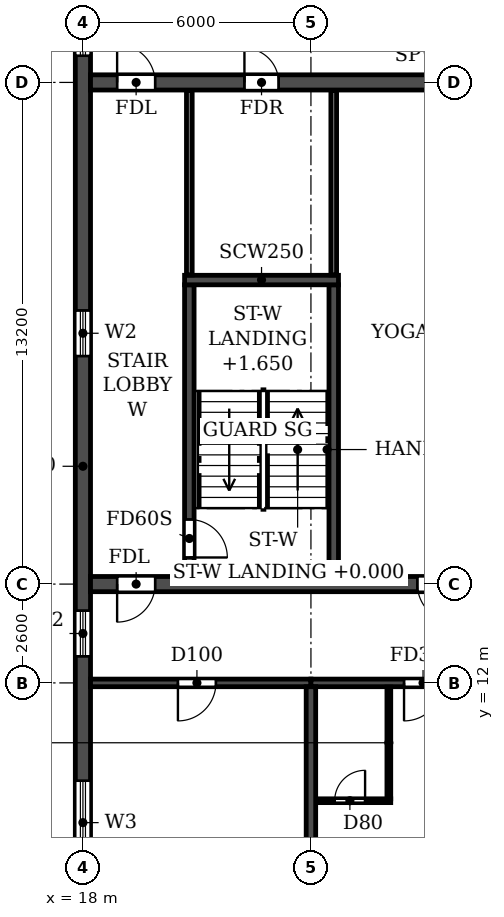
"""IFC4 building model, lengths in metres.
Left out: names, types, materials, properties, quantities, classifications, styles, units other than length and angle.
Written with IfcOpenShell. Run it as: python <this file> out.ifc"""

import sys

from ifc_helpers import new_model, si_unit, direction, frame, frame_2d, origin, place, context, subcontext, project, spatial, rectangle, extrude, element, fill, save


model = new_model("IFC4")
c1 = context("Model", 3, precision=1e-05, world=origin(), true_north=direction((0.0, 1.0)))
c2 = subcontext(c1, "Body", "Model", "MODEL_VIEW")
j1 = project(units=[si_unit("LENGTHUNIT", "METRE"), si_unit("PLANEANGLEUNIT", "RADIAN")], contexts=[c1])
p1 = place(None, origin())
s1 = spatial("IfcSite", under=j1, at=p1, CompositionType="ELEMENT")
p2 = place(p1, origin())
s2 = spatial("IfcBuilding", under=s1, at=p2, CompositionType="ELEMENT")
p3 = place(p2, frame((0.0, 0.0, 191.7)))
s3 = spatial("IfcBuildingStorey", under=s2, at=p3, CompositionType="ELEMENT", Elevation=191.7)
p4 = place(p3, frame((24.0, 0.2, 0.0), z_axis=(0.0, 0.0, 1.0), x_axis=(0.0, 1.0, 0.0)))
e1 = element("IfcWall", 1, at=p4, inside=s3, PredefinedType="SHEAR", context=c2, shape_type="SweptSolid", body=[
    extrude(rectangle(XDim=11.7, YDim=0.25, at=frame_2d((5.85, 0.0))), origin(), (0.0, 0.0, 1.0), 3.08),
])
p5 = place(p3, frame((18.0, 4.683, 0.0), z_axis=(0.0, 0.0, 1.0), x_axis=(0.0, 1.0, 0.0)))
e2 = element("IfcWall", 2, at=p5, inside=s3, PredefinedType="SHEAR", context=c2, shape_type="SweptSolid", body=[
    extrude(rectangle(XDim=31.834, YDim=0.4, at=frame_2d((15.917, 0.0))), origin(), (0.0, 0.0, 1.0), 3.08),
])
p6 = place(p5, frame((23.817, 0.0, 0.9)))
e3 = element("IfcOpeningElement", 3, at=p6, cuts=e2, PredefinedType="OPENING", context=c2, shape_type="SweptSolid", body=[
    extrude(rectangle(XDim=1.2, YDim=1.5, at=frame_2d((0.6, 0.75))), frame((0.0, 0.21, 0.0), z_axis=(0.0, -1.0, 0.0), x_axis=(1.0, 0.0, 0.0)), (0.0, 0.0, 1.0), 0.42),
])
p7 = place(p5, frame((8.017, 0.0, 0.9)))
e4 = element("IfcOpeningElement", 4, at=p7, cuts=e2, PredefinedType="OPENING", context=c2, shape_type="SweptSolid", body=[
    extrude(rectangle(XDim=1.2, YDim=1.5, at=frame_2d((0.6, 0.75))), frame((0.0, 0.21, 0.0), z_axis=(0.0, -1.0, 0.0), x_axis=(1.0, 0.0, 0.0)), (0.0, 0.0, 1.0), 0.42),
])
p8 = place(p5, frame((27.694, 0.0, 0.6)))
e5 = element("IfcOpeningElement", 5, at=p8, cuts=e2, PredefinedType="OPENING", context=c2, shape_type="SweptSolid", body=[
    extrude(rectangle(XDim=2.2, YDim=1.8, at=frame_2d((1.1, 0.9))), frame((0.0, 0.21, 0.0), z_axis=(0.0, -1.0, 0.0), x_axis=(1.0, 0.0, 0.0)), (0.0, 0.0, 1.0), 0.42),
])
p9 = place(p5, frame((2.541, 0.0, 0.6)))
e6 = element("IfcOpeningElement", 6, at=p9, cuts=e2, PredefinedType="OPENING", context=c2, shape_type="SweptSolid", body=[
    extrude(rectangle(XDim=2.2, YDim=1.8, at=frame_2d((1.1, 0.9))), frame((0.0, 0.21, 0.0), z_axis=(0.0, -1.0, 0.0), x_axis=(1.0, 0.0, 0.0)), (0.0, 0.0, 1.0), 0.42),
])
p10 = place(p5, frame((15.917, 0.0, 0.9)))
e7 = element("IfcOpeningElement", 7, at=p10, cuts=e2, PredefinedType="OPENING", context=c2, shape_type="SweptSolid", body=[
    extrude(rectangle(XDim=1.2, YDim=1.5, at=frame_2d((0.6, 0.75))), frame((0.0, 0.21, 0.0), z_axis=(0.0, -1.0, 0.0), x_axis=(1.0, 0.0, 0.0)), (0.0, 0.0, 1.0), 0.42),
])
p11 = place(p3, frame((18.2, 12.0, 0.0), z_axis=(0.0, 0.0, 1.0), x_axis=(1.0, 0.0, 0.0)))
e8 = element("IfcWall", 8, at=p11, inside=s3, PredefinedType="SHEAR", context=c2, shape_type="SweptSolid", body=[
    extrude(rectangle(XDim=5.8, YDim=0.2, at=frame_2d((2.9, 0.0))), origin(), (0.0, 0.0, 1.0), 2.48),
])
p12 = place(p11, frame((2.3, 0.0, 0.0)))
e9 = element("IfcOpeningElement", 9, at=p12, cuts=e8, PredefinedType="OPENING", context=c2, shape_type="SweptSolid", body=[
    extrude(rectangle(XDim=1.0, YDim=2.1, at=frame_2d((0.5, 1.05))), frame((0.0, 0.11, 0.0), z_axis=(0.0, -1.0, 0.0), x_axis=(1.0, 0.0, 0.0)), (0.0, 0.0, 1.0), 0.22),
])
p13 = place(p3, frame((24.0, 12.0, 0.0), z_axis=(0.0, 0.0, 1.0), x_axis=(1.0, 0.0, 0.0)))
e10 = element("IfcWall", 10, at=p13, inside=s3, PredefinedType="SHEAR", context=c2, shape_type="SweptSolid", body=[
    extrude(rectangle(XDim=6.0, YDim=0.2, at=frame_2d((3.0, 0.0))), origin(), (0.0, 0.0, 1.0), 2.48),
])
p14 = place(p13, frame((2.45, 0.0, 0.0)))
e11 = element("IfcOpeningElement", 11, at=p14, cuts=e10, PredefinedType="OPENING", context=c2, shape_type="SweptSolid", body=[
    extrude(rectangle(XDim=1.0, YDim=2.1, at=frame_2d((0.5, 1.05))), frame((0.0, 0.11, 0.0), z_axis=(0.0, -1.0, 0.0), x_axis=(1.0, 0.0, 0.0)), (0.0, 0.0, 1.0), 0.22),
])
p15 = place(p3, frame((18.2, 14.6, 0.0), z_axis=(0.0, 0.0, 1.0), x_axis=(1.0, 0.0, 0.0)))
e12 = element("IfcWall", 12, at=p15, inside=s3, PredefinedType="SOLIDWALL", context=c2, shape_type="SweptSolid", body=[
    extrude(rectangle(XDim=65.6, YDim=0.4, at=frame_2d((32.8, 0.0))), origin(), (0.0, 0.0, 1.0), 3.08),
])
p16 = place(p15, frame((0.7, 0.0, 0.0)))
e13 = element("IfcOpeningElement", 13, at=p16, cuts=e12, PredefinedType="OPENING", context=c2, shape_type="SweptSolid", body=[
    extrude(rectangle(XDim=1.0, YDim=2.1, at=frame_2d((0.5, 1.05))), frame((0.0, 0.21, 0.0), z_axis=(0.0, -1.0, 0.0), x_axis=(1.0, 0.0, 0.0)), (0.0, 0.0, 1.0), 0.42),
])
p17 = place(p15, frame((8.6, 0.0, 0.0)))
e14 = element("IfcOpeningElement", 14, at=p17, cuts=e12, PredefinedType="OPENING", context=c2, shape_type="SweptSolid", body=[
    extrude(rectangle(XDim=1.0, YDim=2.1, at=frame_2d((0.5, 1.05))), frame((0.0, 0.21, 0.0), z_axis=(0.0, -1.0, 0.0), x_axis=(1.0, 0.0, 0.0)), (0.0, 0.0, 1.0), 0.42),
])
p18 = place(p15, frame((13.2, 0.0, 0.0)))
e15 = element("IfcOpeningElement", 15, at=p18, cuts=e12, PredefinedType="OPENING", context=c2, shape_type="SweptSolid", body=[
    extrude(rectangle(XDim=1.0, YDim=2.1, at=frame_2d((0.5, 1.05))), frame((0.0, 0.21, 0.0), z_axis=(0.0, -1.0, 0.0), x_axis=(1.0, 0.0, 0.0)), (0.0, 0.0, 1.0), 0.42),
])
p19 = place(p15, frame((25.55, 0.0, 0.0)))
e16 = element("IfcOpeningElement", 16, at=p19, cuts=e12, PredefinedType="OPENING", context=c2, shape_type="SweptSolid", body=[
    extrude(rectangle(XDim=1.5, YDim=2.1, at=frame_2d((0.75, 1.05))), frame((0.0, 0.21, 0.0), z_axis=(0.0, -1.0, 0.0), x_axis=(1.0, 0.0, 0.0)), (0.0, 0.0, 1.0), 0.42),
])
p20 = place(p15, frame((29.7, 0.0, 0.0)))
e17 = element("IfcOpeningElement", 17, at=p20, cuts=e12, PredefinedType="OPENING", context=c2, shape_type="SweptSolid", body=[
    extrude(rectangle(XDim=1.0, YDim=2.1, at=frame_2d((0.5, 1.05))), frame((0.0, 0.21, 0.0), z_axis=(0.0, -1.0, 0.0), x_axis=(1.0, 0.0, 0.0)), (0.0, 0.0, 1.0), 0.42),
])
p21 = place(p15, frame((32.3, 0.0, 0.0)))
e18 = element("IfcOpeningElement", 18, at=p21, cuts=e12, PredefinedType="OPENING", context=c2, shape_type="SweptSolid", body=[
    extrude(rectangle(XDim=1.0, YDim=2.1, at=frame_2d((0.5, 1.05))), frame((0.0, 0.21, 0.0), z_axis=(0.0, -1.0, 0.0), x_axis=(1.0, 0.0, 0.0)), (0.0, 0.0, 1.0), 0.42),
])
p22 = place(p15, frame((34.9, 0.0, 0.0)))
e19 = element("IfcOpeningElement", 19, at=p22, cuts=e12, PredefinedType="OPENING", context=c2, shape_type="SweptSolid", body=[
    extrude(rectangle(XDim=1.0, YDim=2.1, at=frame_2d((0.5, 1.05))), frame((0.0, 0.21, 0.0), z_axis=(0.0, -1.0, 0.0), x_axis=(1.0, 0.0, 0.0)), (0.0, 0.0, 1.0), 0.42),
])
p23 = place(p15, frame((38.55, 0.0, 0.0)))
e20 = element("IfcOpeningElement", 20, at=p23, cuts=e12, PredefinedType="OPENING", context=c2, shape_type="SweptSolid", body=[
    extrude(rectangle(XDim=1.5, YDim=2.1, at=frame_2d((0.75, 1.05))), frame((0.0, 0.21, 0.0), z_axis=(0.0, -1.0, 0.0), x_axis=(1.0, 0.0, 0.0)), (0.0, 0.0, 1.0), 0.42),
])
p24 = place(p15, frame((51.4, 0.0, 0.0)))
e21 = element("IfcOpeningElement", 21, at=p24, cuts=e12, PredefinedType="OPENING", context=c2, shape_type="SweptSolid", body=[
    extrude(rectangle(XDim=1.0, YDim=2.1, at=frame_2d((0.5, 1.05))), frame((0.0, 0.21, 0.0), z_axis=(0.0, -1.0, 0.0), x_axis=(1.0, 0.0, 0.0)), (0.0, 0.0, 1.0), 0.42),
])
p25 = place(p15, frame((56.0, 0.0, 0.0)))
e22 = element("IfcOpeningElement", 22, at=p25, cuts=e12, PredefinedType="OPENING", context=c2, shape_type="SweptSolid", body=[
    extrude(rectangle(XDim=1.0, YDim=2.1, at=frame_2d((0.5, 1.05))), frame((0.0, 0.21, 0.0), z_axis=(0.0, -1.0, 0.0), x_axis=(1.0, 0.0, 0.0)), (0.0, 0.0, 1.0), 0.42),
])
p26 = place(p15, frame((63.9, 0.0, 0.0)))
e23 = element("IfcOpeningElement", 23, at=p26, cuts=e12, PredefinedType="OPENING", context=c2, shape_type="SweptSolid", body=[
    extrude(rectangle(XDim=1.0, YDim=2.1, at=frame_2d((0.5, 1.05))), frame((0.0, 0.21, 0.0), z_axis=(0.0, -1.0, 0.0), x_axis=(1.0, 0.0, 0.0)), (0.0, 0.0, 1.0), 0.42),
])
p27 = place(p3, frame((18.2, 27.8, 0.0), z_axis=(0.0, 0.0, 1.0), x_axis=(1.0, 0.0, 0.0)))
e24 = element("IfcWall", 24, at=p27, inside=s3, PredefinedType="SOLIDWALL", context=c2, shape_type="SweptSolid", body=[
    extrude(rectangle(XDim=65.6, YDim=0.4, at=frame_2d((32.8, 0.0))), origin(), (0.0, 0.0, 1.0), 3.08),
])
p28 = place(p27, frame((0.7, 0.0, 0.0)))
e25 = element("IfcOpeningElement", 25, at=p28, cuts=e24, PredefinedType="OPENING", context=c2, shape_type="SweptSolid", body=[
    extrude(rectangle(XDim=1.0, YDim=2.1, at=frame_2d((0.5, 1.05))), frame((0.0, 0.21, 0.0), z_axis=(0.0, -1.0, 0.0), x_axis=(1.0, 0.0, 0.0)), (0.0, 0.0, 1.0), 0.42),
])
p29 = place(p27, frame((4.05, 0.0, 0.0)))
e26 = element("IfcOpeningElement", 26, at=p29, cuts=e24, PredefinedType="OPENING", context=c2, shape_type="SweptSolid", body=[
    extrude(rectangle(XDim=0.9, YDim=2.1, at=frame_2d((0.45, 1.05))), frame((0.0, 0.21, 0.0), z_axis=(0.0, -1.0, 0.0), x_axis=(1.0, 0.0, 0.0)), (0.0, 0.0, 1.0), 0.42),
])
p30 = place(p27, frame((13.25, 0.0, 0.0)))
e27 = element("IfcOpeningElement", 27, at=p30, cuts=e24, PredefinedType="OPENING", context=c2, shape_type="SweptSolid", body=[
    extrude(rectangle(XDim=0.9, YDim=2.1, at=frame_2d((0.45, 1.05))), frame((0.0, 0.21, 0.0), z_axis=(0.0, -1.0, 0.0), x_axis=(1.0, 0.0, 0.0)), (0.0, 0.0, 1.0), 0.42),
])
p31 = place(p27, frame((16.4, 0.0, 0.0)))
e28 = element("IfcOpeningElement", 28, at=p31, cuts=e24, PredefinedType="OPENING", context=c2, shape_type="SweptSolid", body=[
    extrude(rectangle(XDim=1.0, YDim=2.1, at=frame_2d((0.5, 1.05))), frame((0.0, 0.21, 0.0), z_axis=(0.0, -1.0, 0.0), x_axis=(1.0, 0.0, 0.0)), (0.0, 0.0, 1.0), 0.42),
])
p32 = place(p27, frame((21.6, 0.0, 0.0)))
e29 = element("IfcOpeningElement", 29, at=p32, cuts=e24, PredefinedType="OPENING", context=c2, shape_type="SweptSolid", body=[
    extrude(rectangle(XDim=1.0, YDim=2.1, at=frame_2d((0.5, 1.05))), frame((0.0, 0.21, 0.0), z_axis=(0.0, -1.0, 0.0), x_axis=(1.0, 0.0, 0.0)), (0.0, 0.0, 1.0), 0.42),
])
p33 = place(p27, frame((29.4, 0.0, 0.0)))
e30 = element("IfcOpeningElement", 30, at=p33, cuts=e24, PredefinedType="OPENING", context=c2, shape_type="SweptSolid", body=[
    extrude(rectangle(XDim=1.0, YDim=2.1, at=frame_2d((0.5, 1.05))), frame((0.0, 0.21, 0.0), z_axis=(0.0, -1.0, 0.0), x_axis=(1.0, 0.0, 0.0)), (0.0, 0.0, 1.0), 0.42),
])
p34 = place(p27, frame((32.3, 0.0, 0.0)))
e31 = element("IfcOpeningElement", 31, at=p34, cuts=e24, PredefinedType="OPENING", context=c2, shape_type="SweptSolid", body=[
    extrude(rectangle(XDim=1.0, YDim=2.1, at=frame_2d((0.5, 1.05))), frame((0.0, 0.21, 0.0), z_axis=(0.0, -1.0, 0.0), x_axis=(1.0, 0.0, 0.0)), (0.0, 0.0, 1.0), 0.42),
])
p35 = place(p27, frame((35.2, 0.0, 0.0)))
e32 = element("IfcOpeningElement", 32, at=p35, cuts=e24, PredefinedType="OPENING", context=c2, shape_type="SweptSolid", body=[
    extrude(rectangle(XDim=1.0, YDim=2.1, at=frame_2d((0.5, 1.05))), frame((0.0, 0.21, 0.0), z_axis=(0.0, -1.0, 0.0), x_axis=(1.0, 0.0, 0.0)), (0.0, 0.0, 1.0), 0.42),
])
p36 = place(p27, frame((37.8, 0.0, 0.0)))
e33 = element("IfcOpeningElement", 33, at=p36, cuts=e24, PredefinedType="OPENING", context=c2, shape_type="SweptSolid", body=[
    extrude(rectangle(XDim=1.0, YDim=2.1, at=frame_2d((0.5, 1.05))), frame((0.0, 0.21, 0.0), z_axis=(0.0, -1.0, 0.0), x_axis=(1.0, 0.0, 0.0)), (0.0, 0.0, 1.0), 0.42),
])
p37 = place(p27, frame((41.7, 0.0, 0.0)))
e34 = element("IfcOpeningElement", 34, at=p37, cuts=e24, PredefinedType="OPENING", context=c2, shape_type="SweptSolid", body=[
    extrude(rectangle(XDim=1.0, YDim=2.1, at=frame_2d((0.5, 1.05))), frame((0.0, 0.21, 0.0), z_axis=(0.0, -1.0, 0.0), x_axis=(1.0, 0.0, 0.0)), (0.0, 0.0, 1.0), 0.42),
])
p38 = place(p27, frame((45.6, 0.0, 0.0)))
e35 = element("IfcOpeningElement", 35, at=p38, cuts=e24, PredefinedType="OPENING", context=c2, shape_type="SweptSolid", body=[
    extrude(rectangle(XDim=1.0, YDim=2.1, at=frame_2d((0.5, 1.05))), frame((0.0, 0.21, 0.0), z_axis=(0.0, -1.0, 0.0), x_axis=(1.0, 0.0, 0.0)), (0.0, 0.0, 1.0), 0.42),
])
p39 = place(p27, frame((48.2, 0.0, 0.0)))
e36 = element("IfcOpeningElement", 36, at=p39, cuts=e24, PredefinedType="OPENING", context=c2, shape_type="SweptSolid", body=[
    extrude(rectangle(XDim=1.0, YDim=2.1, at=frame_2d((0.5, 1.05))), frame((0.0, 0.21, 0.0), z_axis=(0.0, -1.0, 0.0), x_axis=(1.0, 0.0, 0.0)), (0.0, 0.0, 1.0), 0.42),
])
p40 = place(p27, frame((51.45, 0.0, 0.0)))
e37 = element("IfcOpeningElement", 37, at=p40, cuts=e24, PredefinedType="OPENING", context=c2, shape_type="SweptSolid", body=[
    extrude(rectangle(XDim=0.9, YDim=2.1, at=frame_2d((0.45, 1.05))), frame((0.0, 0.21, 0.0), z_axis=(0.0, -1.0, 0.0), x_axis=(1.0, 0.0, 0.0)), (0.0, 0.0, 1.0), 0.42),
])
p41 = place(p27, frame((60.65, 0.0, 0.0)))
e38 = element("IfcOpeningElement", 38, at=p41, cuts=e24, PredefinedType="OPENING", context=c2, shape_type="SweptSolid", body=[
    extrude(rectangle(XDim=0.9, YDim=2.1, at=frame_2d((0.45, 1.05))), frame((0.0, 0.21, 0.0), z_axis=(0.0, -1.0, 0.0), x_axis=(1.0, 0.0, 0.0)), (0.0, 0.0, 1.0), 0.42),
])
p42 = place(p27, frame((63.9, 0.0, 0.0)))
e39 = element("IfcOpeningElement", 39, at=p42, cuts=e24, PredefinedType="OPENING", context=c2, shape_type="SweptSolid", body=[
    extrude(rectangle(XDim=1.0, YDim=2.1, at=frame_2d((0.5, 1.05))), frame((0.0, 0.21, 0.0), z_axis=(0.0, -1.0, 0.0), x_axis=(1.0, 0.0, 0.0)), (0.0, 0.0, 1.0), 0.42),
])
p43 = place(p3, frame((20.8, 14.8, 0.0), z_axis=(0.0, 0.0, 1.0), x_axis=(0.0, 1.0, 0.0)))
e40 = element("IfcWall", 40, at=p43, inside=s3, PredefinedType="SOLIDWALL", context=c2, shape_type="SweptSolid", body=[
    extrude(rectangle(XDim=7.675, YDim=0.25, at=frame_2d((3.837, 0.0))), origin(), (0.0, 0.0, 1.0), 3.08),
])
p44 = place(p43, frame((0.5, 0.0, 0.0)))
e41 = element("IfcOpeningElement", 41, at=p44, cuts=e40, PredefinedType="OPENING", context=c2, shape_type="SweptSolid", body=[
    extrude(rectangle(XDim=1.0, YDim=2.1, at=frame_2d((0.5, 1.05))), frame((0.0, 0.135, 0.0), z_axis=(0.0, -1.0, 0.0), x_axis=(1.0, 0.0, 0.0)), (0.0, 0.0, 1.0), 0.27),
])
p45 = place(p3, frame((24.6, 14.8, 0.0), z_axis=(0.0, 0.0, 1.0), x_axis=(0.0, 1.0, 0.0)))
e42 = element("IfcWall", 42, at=p45, inside=s3, PredefinedType="SOLIDWALL", context=c2, shape_type="SweptSolid", body=[
    extrude(rectangle(XDim=7.675, YDim=0.25, at=frame_2d((3.837, 0.0))), origin(), (0.0, 0.0, 1.0), 3.08),
])
p46 = place(p3, frame((20.675, 22.6, 0.0), z_axis=(0.0, 0.0, 1.0), x_axis=(1.0, 0.0, 0.0)))
e43 = element("IfcWall", 43, at=p46, inside=s3, PredefinedType="SOLIDWALL", context=c2, shape_type="SweptSolid", body=[
    extrude(rectangle(XDim=4.05, YDim=0.25, at=frame_2d((2.025, 0.0))), origin(), (0.0, 0.0, 1.0), 3.08),
])
p47 = place(p3, frame((24.135, 8.9, 0.0), z_axis=(0.0, 0.0, 1.0), x_axis=(1.0, 0.0, 0.0)))
e44 = element("IfcWall", 44, at=p47, inside=s3, PredefinedType="PARTITIONING", context=c2, shape_type="SweptSolid", body=[
    extrude(rectangle(XDim=1.965, YDim=0.1, at=frame_2d((0.982, 0.0))), origin(), (0.0, 0.0, 1.0), 3.08),
])
p48 = place(p47, frame((0.49, 0.0, 0.0)))
e45 = element("IfcOpeningElement", 45, at=p48, cuts=e44, PredefinedType="OPENING", context=c2, shape_type="SweptSolid", body=[
    extrude(rectangle(XDim=0.8, YDim=2.1, at=frame_2d((0.4, 1.05))), frame((0.0, 0.06, 0.0), z_axis=(0.0, -1.0, 0.0), x_axis=(1.0, 0.0, 0.0)), (0.0, 0.0, 1.0), 0.12),
])
p49 = place(p3, frame((26.05, 8.95, 0.0), z_axis=(0.0, 0.0, 1.0), x_axis=(0.0, 1.0, 0.0)))
e46 = element("IfcWall", 46, at=p49, inside=s3, PredefinedType="PARTITIONING", context=c2, shape_type="SweptSolid", body=[
    extrude(rectangle(XDim=2.94, YDim=0.1, at=frame_2d((1.47, 0.0))), origin(), (0.0, 0.0, 1.0), 3.08),
])
for number, where, z_axis, x_axis in (
    (47, (20.8, 22.735, 0.0), (0.0, 0.0, 1.0), (0.0, 1.0, 0.0)),
    (48, (24.6, 22.735, 0.0), (0.0, 0.0, 1.0), (0.0, 1.0, 0.0)),
):
    element("IfcWall", number, at=place(p3, frame(where, z_axis=z_axis, x_axis=x_axis)), inside=s3, PredefinedType="PARTITIONING", context=c2, shape_type="SweptSolid", body=[
        extrude(rectangle(XDim=4.855, YDim=0.15, at=frame_2d((2.427, 0.0))), origin(), (0.0, 0.0, 1.0), 3.08),
    ])
p50 = place(p6, origin())
e49 = element("IfcWindow", 49, at=p50, inside=s3, PartitioningType="SINGLE_PANEL", PredefinedType="WINDOW", context=c2, shape_type="SweptSolid", body=[
    extrude(rectangle(XDim=1.2, YDim=1.5, at=frame_2d((0.6, 0.75))), frame((0.0, 0.03, 0.0), z_axis=(0.0, -1.0, 0.0), x_axis=(1.0, 0.0, 0.0)), (0.0, 0.0, 1.0), 0.06),
])
fill(e3, e49)
p51 = place(p7, origin())
e50 = element("IfcWindow", 50, at=p51, inside=s3, PartitioningType="SINGLE_PANEL", PredefinedType="WINDOW", context=c2, shape_type="SweptSolid", body=[
    extrude(rectangle(XDim=1.2, YDim=1.5, at=frame_2d((0.6, 0.75))), frame((0.0, 0.03, 0.0), z_axis=(0.0, -1.0, 0.0), x_axis=(1.0, 0.0, 0.0)), (0.0, 0.0, 1.0), 0.06),
])
fill(e4, e50)
p52 = place(p9, origin())
e51 = element("IfcWindow", 51, at=p52, inside=s3, PartitioningType="DOUBLE_PANEL_HORIZONTAL", PredefinedType="WINDOW", context=c2, shape_type="SweptSolid", body=[
    extrude(rectangle(XDim=2.2, YDim=1.8, at=frame_2d((1.1, 0.9))), frame((0.0, 0.03, 0.0), z_axis=(0.0, -1.0, 0.0), x_axis=(1.0, 0.0, 0.0)), (0.0, 0.0, 1.0), 0.06),
])
fill(e6, e51)
p53 = place(p10, origin())
e52 = element("IfcWindow", 52, at=p53, inside=s3, PartitioningType="SINGLE_PANEL", PredefinedType="WINDOW", context=c2, shape_type="SweptSolid", body=[
    extrude(rectangle(XDim=1.2, YDim=1.5, at=frame_2d((0.6, 0.75))), frame((0.0, 0.03, 0.0), z_axis=(0.0, -1.0, 0.0), x_axis=(1.0, 0.0, 0.0)), (0.0, 0.0, 1.0), 0.06),
])
fill(e7, e52)
p54 = place(p28, origin())
e53 = element("IfcDoor", 53, at=p54, inside=s3, OperationType="SINGLE_SWING_LEFT", PredefinedType="DOOR", context=c2, shape_type="SweptSolid", body=[
    extrude(rectangle(XDim=1.0, YDim=2.1, at=frame_2d((0.5, 1.05))), frame((0.0, 0.025, 0.0), z_axis=(0.0, -1.0, 0.0), x_axis=(1.0, 0.0, 0.0)), (0.0, 0.0, 1.0), 0.05),
])
fill(e25, e53)
p55 = place(p29, origin())
e54 = element("IfcDoor", 54, at=p55, inside=s3, OperationType="SINGLE_SWING_LEFT", PredefinedType="DOOR", context=c2, shape_type="SweptSolid", body=[
    extrude(rectangle(XDim=0.9, YDim=2.1, at=frame_2d((0.45, 1.05))), frame((0.0, 0.025, 0.0), z_axis=(0.0, -1.0, 0.0), x_axis=(1.0, 0.0, 0.0)), (0.0, 0.0, 1.0), 0.05),
])
fill(e26, e54)
p56 = place(p16, frame((1.0, 0.0, 0.0), z_axis=(0.0, 0.0, 1.0), x_axis=(-1.0, 0.0, 0.0)))
e55 = element("IfcDoor", 55, at=p56, inside=s3, OperationType="SINGLE_SWING_RIGHT", PredefinedType="DOOR", context=c2, shape_type="SweptSolid", body=[
    extrude(rectangle(XDim=1.0, YDim=2.1, at=frame_2d((0.5, 1.05))), frame((0.0, 0.025, 0.0), z_axis=(0.0, -1.0, 0.0), x_axis=(1.0, 0.0, 0.0)), (0.0, 0.0, 1.0), 0.05),
])
fill(e13, e55)
p57 = place(p17, frame((1.0, 0.0, 0.0), z_axis=(0.0, 0.0, 1.0), x_axis=(-1.0, 0.0, 0.0)))
e56 = element("IfcDoor", 56, at=p57, inside=s3, OperationType="SINGLE_SWING_LEFT", PredefinedType="DOOR", context=c2, shape_type="SweptSolid", body=[
    extrude(rectangle(XDim=1.0, YDim=2.1, at=frame_2d((0.5, 1.05))), frame((0.0, 0.025, 0.0), z_axis=(0.0, -1.0, 0.0), x_axis=(1.0, 0.0, 0.0)), (0.0, 0.0, 1.0), 0.05),
])
fill(e14, e56)
p58 = place(p12, frame((1.0, 0.0, 0.0), z_axis=(0.0, 0.0, 1.0), x_axis=(-1.0, 0.0, 0.0)))
e57 = element("IfcDoor", 57, at=p58, inside=s3, OperationType="SINGLE_SWING_RIGHT", PredefinedType="DOOR", context=c2, shape_type="SweptSolid", body=[
    extrude(rectangle(XDim=1.0, YDim=2.1, at=frame_2d((0.5, 1.05))), frame((0.0, 0.025, 0.0), z_axis=(0.0, -1.0, 0.0), x_axis=(1.0, 0.0, 0.0)), (0.0, 0.0, 1.0), 0.05),
])
fill(e9, e57)
p59 = place(p48, origin())
e58 = element("IfcDoor", 58, at=p59, inside=s3, OperationType="SINGLE_SWING_RIGHT", PredefinedType="DOOR", context=c2, shape_type="SweptSolid", body=[
    extrude(rectangle(XDim=0.8, YDim=2.1, at=frame_2d((0.4, 1.05))), frame((0.0, 0.025, 0.0), z_axis=(0.0, -1.0, 0.0), x_axis=(1.0, 0.0, 0.0)), (0.0, 0.0, 1.0), 0.05),
])
fill(e45, e58)
p60 = place(p14, frame((1.0, 0.0, 0.0), z_axis=(0.0, 0.0, 1.0), x_axis=(-1.0, 0.0, 0.0)))
e59 = element("IfcDoor", 59, at=p60, inside=s3, OperationType="SINGLE_SWING_RIGHT", PredefinedType="DOOR", context=c2, shape_type="SweptSolid", body=[
    extrude(rectangle(XDim=1.0, YDim=2.1, at=frame_2d((0.5, 1.05))), frame((0.0, 0.025, 0.0), z_axis=(0.0, -1.0, 0.0), x_axis=(1.0, 0.0, 0.0)), (0.0, 0.0, 1.0), 0.05),
])
fill(e11, e59)
p61 = place(p44, frame((1.0, 0.0, 0.0), z_axis=(0.0, 0.0, 1.0), x_axis=(-1.0, 0.0, 0.0)))
e60 = element("IfcDoor", 60, at=p61, inside=s3, OperationType="SINGLE_SWING_RIGHT", PredefinedType="DOOR", context=c2, shape_type="SweptSolid", body=[
    extrude(rectangle(XDim=1.0, YDim=2.1, at=frame_2d((0.5, 1.05))), frame((0.0, 0.025, 0.0), z_axis=(0.0, -1.0, 0.0), x_axis=(1.0, 0.0, 0.0)), (0.0, 0.0, 1.0), 0.05),
])
fill(e41, e60)
save(model, sys.argv[1])
